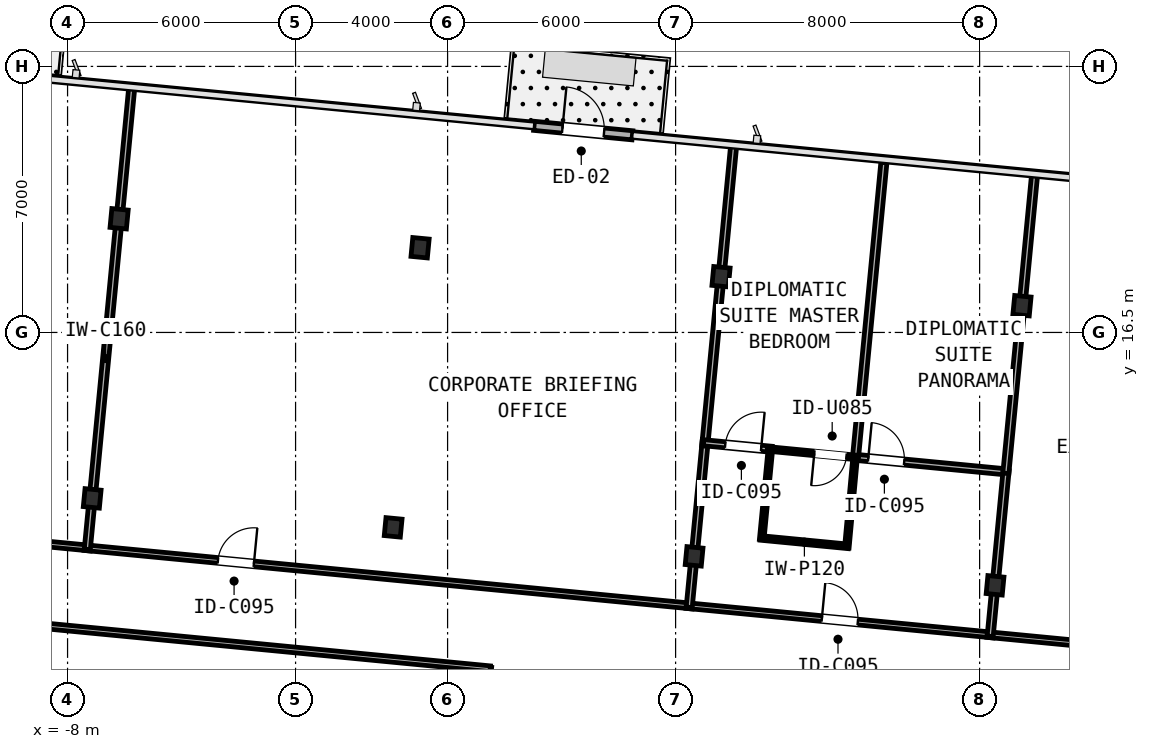
"""IFC4 building model, lengths in metres.
Left out: names, types, materials, properties, quantities, classifications, styles, units other than length and angle.
Written with IfcOpenShell. Run it as: python <this file> out.ifc"""

import sys

from ifc_helpers import new_model, si_unit, direction, frame, frame_2d, origin, origin_2d, place, context, subcontext, project, spatial, rectangle, i_section, extrude, element, fill, save


model = new_model("IFC4")
c1 = context("Model", 3, precision=1e-05, world=origin(), true_north=direction((0.0, 1.0)))
c2 = subcontext(c1, "Body", "Model", "MODEL_VIEW")
j1 = project(units=[si_unit("LENGTHUNIT", "METRE"), si_unit("PLANEANGLEUNIT", "RADIAN")], contexts=[c1])
p1 = place(None, origin())
s1 = spatial("IfcSite", under=j1, at=p1, CompositionType="ELEMENT")
p2 = place(p1, origin())
s2 = spatial("IfcBuilding", under=s1, at=p2, CompositionType="ELEMENT")
p3 = place(p2, frame((0.0, 0.0, 160.05)))
s3 = spatial("IfcBuildingStorey", under=s2, at=p3, CompositionType="ELEMENT", Elevation=160.05)
p4 = place(p3, frame((-7.352, 12.134, 0.0), z_axis=(0.0, 0.0, 1.0), x_axis=(0.995396198367, -0.09584575252, 0.0)))
e1 = element("IfcColumn", 1, at=p4, inside=s3, PredefinedType="COLUMN", context=c2, shape_type="SweptSolid", body=[
    extrude(i_section(OverallWidth=0.424, OverallDepth=0.474, WebThickness=0.048, FlangeThickness=0.077, FilletRadius=0.031, at=origin_2d()), origin(), (0.0, 0.0, 1.0), 3.45),
])
p5 = place(p3, frame((-6.643, 19.492, 0.0), z_axis=(0.0, 0.0, 1.0), x_axis=(0.995396198367, -0.09584575252, 0.0)))
e2 = element("IfcColumn", 2, at=p5, inside=s3, PredefinedType="COLUMN", context=c2, shape_type="SweptSolid", body=[
    extrude(i_section(OverallWidth=0.432, OverallDepth=0.498, WebThickness=0.056, FlangeThickness=0.089, FilletRadius=0.031, at=origin_2d()), origin(), (0.0, 0.0, 1.0), 3.45),
])
p6 = place(p3, frame((0.568, 11.371, 0.0), z_axis=(0.0, 0.0, 1.0), x_axis=(0.995396198367, -0.09584575252, 0.0)))
e3 = element("IfcColumn", 3, at=p6, inside=s3, PredefinedType="COLUMN", context=c2, shape_type="SweptSolid", body=[
    extrude(i_section(OverallWidth=0.424, OverallDepth=0.474, WebThickness=0.048, FlangeThickness=0.077, FilletRadius=0.031, at=origin_2d()), origin(), (0.0, 0.0, 1.0), 3.45),
])
p7 = place(p3, frame((1.276, 18.729, 0.0), z_axis=(0.0, 0.0, 1.0), x_axis=(0.995396198367, -0.09584575252, 0.0)))
e4 = element("IfcColumn", 4, at=p7, inside=s3, PredefinedType="COLUMN", context=c2, shape_type="SweptSolid", body=[
    extrude(i_section(OverallWidth=0.432, OverallDepth=0.498, WebThickness=0.056, FlangeThickness=0.089, FilletRadius=0.031, at=origin_2d()), origin(), (0.0, 0.0, 1.0), 3.45),
])
p8 = place(p3, frame((8.487, 10.609, 0.0), z_axis=(0.0, 0.0, 1.0), x_axis=(0.995396198367, -0.09584575252, 0.0)))
e5 = element("IfcColumn", 5, at=p8, inside=s3, PredefinedType="COLUMN", context=c2, shape_type="SweptSolid", body=[
    extrude(i_section(OverallWidth=0.424, OverallDepth=0.474, WebThickness=0.048, FlangeThickness=0.077, FilletRadius=0.031, at=origin_2d()), origin(), (0.0, 0.0, 1.0), 3.45),
])
p9 = place(p3, frame((9.195, 17.967, 0.0), z_axis=(0.0, 0.0, 1.0), x_axis=(0.995396198367, -0.09584575252, 0.0)))
e6 = element("IfcColumn", 6, at=p9, inside=s3, PredefinedType="COLUMN", context=c2, shape_type="SweptSolid", body=[
    extrude(i_section(OverallWidth=0.432, OverallDepth=0.498, WebThickness=0.056, FlangeThickness=0.089, FilletRadius=0.031, at=origin_2d()), origin(), (0.0, 0.0, 1.0), 3.45),
])
p10 = place(p3, frame((16.406, 9.846, 0.0), z_axis=(0.0, 0.0, 1.0), x_axis=(0.995396198367, -0.09584575252, 0.0)))
e7 = element("IfcColumn", 7, at=p10, inside=s3, PredefinedType="COLUMN", context=c2, shape_type="SweptSolid", body=[
    extrude(i_section(OverallWidth=0.424, OverallDepth=0.474, WebThickness=0.048, FlangeThickness=0.077, FilletRadius=0.031, at=origin_2d()), origin(), (0.0, 0.0, 1.0), 3.45),
])
p11 = place(p3, frame((17.115, 17.204, 0.0), z_axis=(0.0, 0.0, 1.0), x_axis=(0.995396198367, -0.09584575252, 0.0)))
e8 = element("IfcColumn", 8, at=p11, inside=s3, PredefinedType="COLUMN", context=c2, shape_type="SweptSolid", body=[
    extrude(i_section(OverallWidth=0.432, OverallDepth=0.498, WebThickness=0.056, FlangeThickness=0.089, FilletRadius=0.031, at=origin_2d()), origin(), (0.0, 0.0, 1.0), 3.45),
])
p12 = place(p3, frame((4.275, 21.937, 0.0), z_axis=(0.0, 0.0, 1.0), x_axis=(0.995394049959, -0.095868061976, 0.0)))
e9 = element("IfcWall", 9, at=p12, inside=s3, PredefinedType="STANDARD", context=c2, shape_type="SweptSolid", body=[
    extrude(rectangle(XDim=2.6, YDim=0.24, at=frame_2d((1.3, 0.0))), origin(), (0.0, 0.0, 1.0), 3.19),
])
p13 = place(p12, frame((0.75, 0.0, 0.0)))
e10 = element("IfcOpeningElement", 10, at=p13, cuts=e9, PredefinedType="OPENING", context=c2, shape_type="SweptSolid", body=[
    extrude(rectangle(XDim=1.1, YDim=2.15, at=frame_2d((0.55, 1.075))), frame((0.0, 0.13, 0.0), z_axis=(0.0, -1.0, 0.0), x_axis=(1.0, 0.0, 0.0)), (0.0, 0.0, 1.0), 0.26),
])
p14 = place(p3, frame((-19.02, 11.943, 0.0), z_axis=(0.0, 0.0, 1.0), x_axis=(0.995395421372, -0.095853821582, 0.0)))
e11 = element("IfcWall", 11, at=p14, inside=s3, PredefinedType="PARTITIONING", context=c2, shape_type="SweptSolid", body=[
    extrude(rectangle(XDim=11.678, YDim=0.15, at=frame_2d((5.839, 0.0))), origin(), (0.0, 0.0, 1.0), 2.479),
])
p15 = place(p14, frame((7.312, 0.0, 0.0)))
e12 = element("IfcOpeningElement", 12, at=p15, cuts=e11, PredefinedType="OPENING", context=c2, shape_type="SweptSolid", body=[
    extrude(rectangle(XDim=0.95, YDim=2.15, at=frame_2d((0.475, 1.075))), frame((0.0, 0.085, 0.0), z_axis=(0.0, -1.0, 0.0), x_axis=(1.0, 0.0, 0.0)), (0.0, 0.0, 1.0), 0.17),
])
p16 = place(p3, frame((-7.559, 10.84, 0.0), z_axis=(0.0, 0.0, 1.0), x_axis=(0.995396443768, -0.095843203903, 0.0)))
e13 = element("IfcWall", 13, at=p16, inside=s3, PredefinedType="PARTITIONING", context=c2, shape_type="SweptSolid", body=[
    extrude(rectangle(XDim=16.076, YDim=0.15, at=frame_2d((8.038, 0.0))), origin(), (0.0, 0.0, 1.0), 2.479),
])
p17 = place(p16, frame((3.532, 0.0, 0.0)))
e14 = element("IfcOpeningElement", 14, at=p17, cuts=e13, PredefinedType="OPENING", context=c2, shape_type="SweptSolid", body=[
    extrude(rectangle(XDim=0.95, YDim=2.15, at=frame_2d((0.475, 1.075))), frame((0.0, 0.085, 0.0), z_axis=(0.0, -1.0, 0.0), x_axis=(1.0, 0.0, 0.0)), (0.0, 0.0, 1.0), 0.17),
])
p18 = place(p3, frame((8.28, 9.314, 0.0), z_axis=(0.0, 0.0, 1.0), x_axis=(0.995395467524, -0.095853342309, 0.0)))
e15 = element("IfcWall", 15, at=p18, inside=s3, PredefinedType="PARTITIONING", context=c2, shape_type="SweptSolid", body=[
    extrude(rectangle(XDim=8.12, YDim=0.15, at=frame_2d((4.06, 0.0))), origin(), (0.0, 0.0, 1.0), 2.479),
])
p19 = place(p18, frame((3.585, 0.0, 0.0)))
e16 = element("IfcOpeningElement", 16, at=p19, cuts=e15, PredefinedType="OPENING", context=c2, shape_type="SweptSolid", body=[
    extrude(rectangle(XDim=0.95, YDim=2.15, at=frame_2d((0.475, 1.075))), frame((0.0, 0.085, 0.0), z_axis=(0.0, -1.0, 0.0), x_axis=(1.0, 0.0, 0.0)), (0.0, 0.0, 1.0), 0.17),
])
p20 = place(p3, frame((16.199, 8.552, 0.0), z_axis=(0.0, 0.0, 1.0), x_axis=(0.995391104887, -0.095898635608, 0.0)))
e17 = element("IfcWall", 17, at=p20, inside=s3, PredefinedType="PARTITIONING", context=c2, shape_type="SweptSolid", body=[
    extrude(rectangle(XDim=3.722, YDim=0.15, at=frame_2d((1.861, 0.0))), origin(), (0.0, 0.0, 1.0), 2.479),
])
p21 = place(p20, frame((2.457, 0.0, 0.0)))
e18 = element("IfcOpeningElement", 18, at=p21, cuts=e17, PredefinedType="OPENING", context=c2, shape_type="SweptSolid", body=[
    extrude(rectangle(XDim=0.95, YDim=2.15, at=frame_2d((0.475, 1.075))), frame((0.0, 0.085, 0.0), z_axis=(0.0, -1.0, 0.0), x_axis=(1.0, 0.0, 0.0)), (0.0, 0.0, 1.0), 0.17),
])
p22 = place(p3, frame((2.838, 5.135, 0.0), z_axis=(0.0, 0.0, 1.0), x_axis=(0.095772090971, 0.995403288417, 0.0)))
e19 = element("IfcWall", 19, at=p22, inside=s3, PredefinedType="PARTITIONING", context=c2, shape_type="SweptSolid", body=[
    extrude(rectangle(XDim=2.572, YDim=0.15, at=frame_2d((1.286, 0.0))), origin(), (0.0, 0.0, 1.0), 2.479),
])
p23 = place(p3, frame((3.121, 7.651, 0.0), z_axis=(0.0, 0.0, 1.0), x_axis=(-0.995397135603, 0.095836018457, 0.0)))
e20 = element("IfcWall", 20, at=p23, inside=s3, PredefinedType="PARTITIONING", context=c2, shape_type="SweptSolid", body=[
    extrude(rectangle(XDim=18.892, YDim=0.15, at=frame_2d((9.446, 0.0))), origin(), (0.0, 0.0, 1.0), 2.479),
])
p24 = place(p23, frame((14.502, 0.0, 0.0)))
e21 = element("IfcOpeningElement", 21, at=p24, cuts=e20, PredefinedType="OPENING", context=c2, shape_type="SweptSolid", body=[
    extrude(rectangle(XDim=0.95, YDim=2.15, at=frame_2d((0.475, 1.075))), frame((0.0, 0.085, 0.0), z_axis=(0.0, -1.0, 0.0), x_axis=(1.0, 0.0, 0.0)), (0.0, 0.0, 1.0), 0.17),
])
p25 = place(p3, frame((-7.369, 11.958, 0.0), z_axis=(0.0, 0.0, 1.0), x_axis=(-0.095831494917, -0.995397571115, 0.0)))
e22 = element("IfcWall", 22, at=p25, inside=s3, PredefinedType="PARTITIONING", context=c2, shape_type="SweptSolid", body=[
    extrude(rectangle(XDim=1.172, YDim=0.16, at=frame_2d((0.586, 0.0))), origin(), (0.0, 0.0, 1.0), 2.479),
])
p26 = place(p3, frame((-6.66, 19.316, 0.0), z_axis=(0.0, 0.0, 1.0), x_axis=(-0.095853155488, -0.995395485515, 0.0)))
e23 = element("IfcWall", 23, at=p26, inside=s3, PredefinedType="PARTITIONING", context=c2, shape_type="SweptSolid", body=[
    extrude(rectangle(XDim=7.04, YDim=0.16, at=frame_2d((3.52, 0.0))), origin(), (0.0, 0.0, 1.0), 2.479),
])
p27 = place(p3, frame((-6.306, 22.995, 0.0), z_axis=(0.0, 0.0, 1.0), x_axis=(-0.095859866796, -0.995394839216, 0.0)))
e24 = element("IfcWall", 24, at=p27, inside=s3, PredefinedType="PARTITIONING", context=c2, shape_type="SweptSolid", body=[
    extrude(rectangle(XDim=3.344, YDim=0.16, at=frame_2d((1.672, 0.0))), origin(), (0.0, 0.0, 1.0), 3.19),
])
p28 = place(p3, frame((8.47, 10.433, 0.0), z_axis=(0.0, 0.0, 1.0), x_axis=(-0.095831494917, -0.995397571115, 0.0)))
e25 = element("IfcWall", 25, at=p28, inside=s3, PredefinedType="PARTITIONING", context=c2, shape_type="SweptSolid", body=[
    extrude(rectangle(XDim=1.172, YDim=0.16, at=frame_2d((0.586, 0.0))), origin(), (0.0, 0.0, 1.0), 2.479),
])
p29 = place(p3, frame((8.782, 13.677, 0.0), z_axis=(0.0, 0.0, 1.0), x_axis=(-0.095851667856, -0.995395628767, 0.0)))
e26 = element("IfcWall", 26, at=p29, inside=s3, PredefinedType="PARTITIONING", context=c2, shape_type="SweptSolid", body=[
    extrude(rectangle(XDim=2.906, YDim=0.16, at=frame_2d((1.453, 0.0))), origin(), (0.0, 0.0, 1.0), 2.479),
])
p30 = place(p3, frame((9.178, 17.791, 0.0), z_axis=(0.0, 0.0, 1.0), x_axis=(-0.095830387623, -0.995397677719, 0.0)))
e27 = element("IfcWall", 27, at=p30, inside=s3, PredefinedType="PARTITIONING", context=c2, shape_type="SweptSolid", body=[
    extrude(rectangle(XDim=4.298, YDim=0.16, at=frame_2d((2.149, 0.0))), origin(), (0.0, 0.0, 1.0), 2.479),
])
p31 = place(p3, frame((9.533, 21.47, 0.0), z_axis=(0.0, 0.0, 1.0), x_axis=(-0.095859866796, -0.995394839216, 0.0)))
e28 = element("IfcWall", 28, at=p31, inside=s3, PredefinedType="PARTITIONING", context=c2, shape_type="SweptSolid", body=[
    extrude(rectangle(XDim=3.344, YDim=0.16, at=frame_2d((1.672, 0.0))), origin(), (0.0, 0.0, 1.0), 3.19),
])
p32 = place(p3, frame((8.735, 13.599, 0.0), z_axis=(0.0, 0.0, 1.0), x_axis=(0.995394173932, -0.095866774755, 0.0)))
e29 = element("IfcWall", 29, at=p32, inside=s3, PredefinedType="PARTITIONING", context=c2, shape_type="SweptSolid", body=[
    extrude(rectangle(XDim=1.808, YDim=0.16, at=frame_2d((0.904, 0.0))), origin(), (0.0, 0.0, 1.0), 2.479),
])
p33 = place(p32, frame((0.574, 0.0, 0.0)))
e30 = element("IfcOpeningElement", 30, at=p33, cuts=e29, PredefinedType="OPENING", context=c2, shape_type="SweptSolid", body=[
    extrude(rectangle(XDim=0.95, YDim=2.15, at=frame_2d((0.475, 1.075))), frame((0.0, 0.09, 0.0), z_axis=(0.0, -1.0, 0.0), x_axis=(1.0, 0.0, 0.0)), (0.0, 0.0, 1.0), 0.18),
])
p34 = place(p3, frame((12.684, 13.218, 0.0), z_axis=(0.0, 0.0, 1.0), x_axis=(0.995396485523, -0.095842770251, 0.0)))
e31 = element("IfcWall", 31, at=p34, inside=s3, PredefinedType="PARTITIONING", context=c2, shape_type="SweptSolid", body=[
    extrude(rectangle(XDim=4.068, YDim=0.16, at=frame_2d((2.034, 0.0))), origin(), (0.0, 0.0, 1.0), 2.479),
])
p35 = place(p34, frame((0.386, 0.0, 0.0)))
e32 = element("IfcOpeningElement", 32, at=p35, cuts=e31, PredefinedType="OPENING", context=c2, shape_type="SweptSolid", body=[
    extrude(rectangle(XDim=0.95, YDim=2.15, at=frame_2d((0.475, 1.075))), frame((0.0, 0.09, 0.0), z_axis=(0.0, -1.0, 0.0), x_axis=(1.0, 0.0, 0.0)), (0.0, 0.0, 1.0), 0.18),
])
p36 = place(p3, frame((10.498, 13.469, 0.0), z_axis=(0.0, 0.0, 1.0), x_axis=(-0.095842578202, -0.995396504014, 0.0)))
e33 = element("IfcWall", 33, at=p36, inside=s3, PredefinedType="PARTITIONING", context=c2, shape_type="SweptSolid", body=[
    extrude(rectangle(XDim=2.43, YDim=0.12, at=frame_2d((1.215, 0.0))), origin(), (0.0, 0.0, 1.0), 3.19),
])
p37 = place(p3, frame((10.229, 11.094, 0.0), z_axis=(0.0, 0.0, 1.0), x_axis=(0.995403652262, -0.095768309281, 0.0)))
e34 = element("IfcWall", 34, at=p37, inside=s3, PredefinedType="PARTITIONING", context=c2, shape_type="SweptSolid", body=[
    extrude(rectangle(XDim=2.33, YDim=0.12, at=frame_2d((1.165, 0.0))), origin(), (0.0, 0.0, 1.0), 2.718),
])
p38 = place(p3, frame((12.505, 10.834, 0.0), z_axis=(0.0, 0.0, 1.0), x_axis=(0.091622673793, 0.995793796751, 0.0)))
e35 = element("IfcWall", 35, at=p38, inside=s3, PredefinedType="PARTITIONING", context=c2, shape_type="SweptSolid", body=[
    extrude(rectangle(XDim=2.43, YDim=0.12, at=frame_2d((1.215, 0.0))), origin(), (0.0, 0.0, 1.0), 2.718),
])
p39 = place(p3, frame((16.389, 9.671, 0.0), z_axis=(0.0, 0.0, 1.0), x_axis=(-0.095811626391, -0.995399483749, 0.0)))
e36 = element("IfcWall", 36, at=p39, inside=s3, PredefinedType="PARTITIONING", context=c2, shape_type="SweptSolid", body=[
    extrude(rectangle(XDim=1.172, YDim=0.16, at=frame_2d((0.586, 0.0))), origin(), (0.0, 0.0, 1.0), 2.479),
])
p40 = place(p3, frame((16.698, 12.872, 0.0), z_axis=(0.0, 0.0, 1.0), x_axis=(-0.095899197745, -0.995391050729, 0.0)))
e37 = element("IfcWall", 37, at=p40, inside=s3, PredefinedType="PARTITIONING", context=c2, shape_type="SweptSolid", body=[
    extrude(rectangle(XDim=2.864, YDim=0.16, at=frame_2d((1.432, 0.0))), origin(), (0.0, 0.0, 1.0), 2.479),
])
p41 = place(p3, frame((13.481, 20.97, 0.0), z_axis=(0.0, 0.0, 1.0), x_axis=(-0.095851985855, -0.995395598146, 0.0)))
e38 = element("IfcWall", 38, at=p41, inside=s3, PredefinedType="PARTITIONING", context=c2, shape_type="SweptSolid", body=[
    extrude(rectangle(XDim=7.832, YDim=0.16, at=frame_2d((3.916, 0.0))), origin(), (0.0, 0.0, 1.0), 2.557),
])
p42 = place(p3, frame((12.774, 13.21, 0.0), z_axis=(0.0, 0.0, 1.0), x_axis=(-0.995398273854, 0.095824195322, 0.0)))
e39 = element("IfcWall", 39, at=p42, inside=s3, PredefinedType="PARTITIONING", context=c2, shape_type="SweptSolid", body=[
    extrude(rectangle(XDim=2.372, YDim=0.12, at=frame_2d((1.186, 0.0))), origin(), (0.0, 0.0, 1.0), 2.718),
])
p43 = place(p42, frame((0.28, 0.0, 0.0)))
e40 = element("IfcOpeningElement", 40, at=p43, cuts=e39, PredefinedType="OPENING", context=c2, shape_type="SweptSolid", body=[
    extrude(rectangle(XDim=0.85, YDim=2.1, at=frame_2d((0.425, 1.05))), frame((0.0, 0.07, 0.0), z_axis=(0.0, -1.0, 0.0), x_axis=(1.0, 0.0, 0.0)), (0.0, 0.0, 1.0), 0.14),
])
p44 = place(p3, frame((17.098, 17.029, 0.0), z_axis=(0.0, 0.0, 1.0), x_axis=(-0.095856690152, -0.995395145132, 0.0)))
e41 = element("IfcWall", 41, at=p44, inside=s3, PredefinedType="PARTITIONING", context=c2, shape_type="SweptSolid", body=[
    extrude(rectangle(XDim=4.256, YDim=0.16, at=frame_2d((2.128, 0.0))), origin(), (0.0, 0.0, 1.0), 2.479),
])
p45 = place(p3, frame((17.452, 20.708, 0.0), z_axis=(0.0, 0.0, 1.0), x_axis=(-0.095859866796, -0.995394839216, 0.0)))
e42 = element("IfcWall", 42, at=p45, inside=s3, PredefinedType="PARTITIONING", context=c2, shape_type="SweptSolid", body=[
    extrude(rectangle(XDim=3.344, YDim=0.16, at=frame_2d((1.672, 0.0))), origin(), (0.0, 0.0, 1.0), 3.19),
])
p46 = place(p13, origin())
e43 = element("IfcDoor", 43, at=p46, inside=s3, OperationType="SINGLE_SWING_LEFT", PredefinedType="DOOR", context=c2, shape_type="SweptSolid", body=[
    extrude(rectangle(XDim=1.1, YDim=2.15, at=frame_2d((0.55, 1.075))), frame((0.0, 0.025, 0.0), z_axis=(0.0, -1.0, 0.0), x_axis=(1.0, 0.0, 0.0)), (0.0, 0.0, 1.0), 0.05),
])
fill(e10, e43)
p47 = place(p17, frame((0.95, 0.0, 0.0), z_axis=(0.0, 0.0, 1.0), x_axis=(-1.0, 0.0, 0.0)))
e44 = element("IfcDoor", 44, at=p47, inside=s3, OperationType="SINGLE_SWING_RIGHT", PredefinedType="DOOR", context=c2, shape_type="SweptSolid", body=[
    extrude(rectangle(XDim=0.95, YDim=2.15, at=frame_2d((0.475, 1.075))), frame((0.0, 0.025, 0.0), z_axis=(0.0, -1.0, 0.0), x_axis=(1.0, 0.0, 0.0)), (0.0, 0.0, 1.0), 0.05),
])
fill(e14, e44)
p48 = place(p19, frame((0.95, 0.0, 0.0), z_axis=(0.0, 0.0, 1.0), x_axis=(-1.0, 0.0, 0.0)))
e45 = element("IfcDoor", 45, at=p48, inside=s3, OperationType="SINGLE_SWING_LEFT", PredefinedType="DOOR", context=c2, shape_type="SweptSolid", body=[
    extrude(rectangle(XDim=0.95, YDim=2.15, at=frame_2d((0.475, 1.075))), frame((0.0, 0.025, 0.0), z_axis=(0.0, -1.0, 0.0), x_axis=(1.0, 0.0, 0.0)), (0.0, 0.0, 1.0), 0.05),
])
fill(e16, e45)
p49 = place(p33, origin())
e46 = element("IfcDoor", 46, at=p49, inside=s3, OperationType="SINGLE_SWING_RIGHT", PredefinedType="DOOR", context=c2, shape_type="SweptSolid", body=[
    extrude(rectangle(XDim=0.95, YDim=2.15, at=frame_2d((0.475, 1.075))), frame((0.0, 0.025, 0.0), z_axis=(0.0, -1.0, 0.0), x_axis=(1.0, 0.0, 0.0)), (0.0, 0.0, 1.0), 0.05),
])
fill(e30, e46)
p50 = place(p35, origin())
e47 = element("IfcDoor", 47, at=p50, inside=s3, OperationType="SINGLE_SWING_LEFT", PredefinedType="DOOR", context=c2, shape_type="SweptSolid", body=[
    extrude(rectangle(XDim=0.95, YDim=2.15, at=frame_2d((0.475, 1.075))), frame((0.0, 0.025, 0.0), z_axis=(0.0, -1.0, 0.0), x_axis=(1.0, 0.0, 0.0)), (0.0, 0.0, 1.0), 0.05),
])
fill(e32, e47)
p51 = place(p43, frame((0.85, 0.0, 0.0), z_axis=(0.0, 0.0, 1.0), x_axis=(-1.0, 0.0, 0.0)))
e48 = element("IfcDoor", 48, at=p51, inside=s3, OperationType="SINGLE_SWING_RIGHT", PredefinedType="DOOR", context=c2, shape_type="SweptSolid", body=[
    extrude(rectangle(XDim=0.85, YDim=2.1, at=frame_2d((0.425, 1.05))), frame((0.0, 0.025, 0.0), z_axis=(0.0, -1.0, 0.0), x_axis=(1.0, 0.0, 0.0)), (0.0, 0.0, 1.0), 0.05),
])
fill(e40, e48)
save(model, sys.argv[1])
